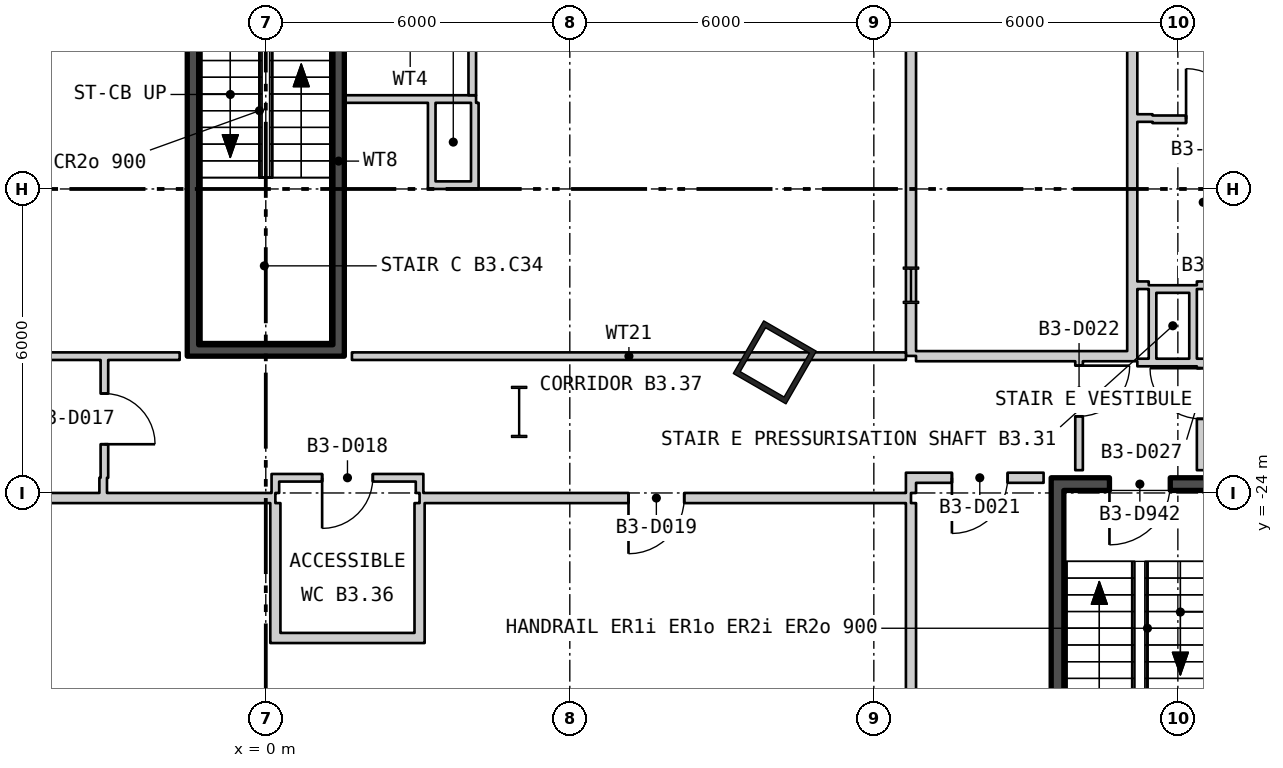
"""IFC4 building model, lengths in metres.
Left out: names, types, materials, properties, quantities, classifications, styles, units other than length and angle.
Written with IfcOpenShell. Run it as: python <this file> out.ifc"""

import sys

from ifc_helpers import new_model, si_unit, direction, frame, frame_2d, origin, origin_2d, place, context, subcontext, project, spatial, rectangle, hollow_rectangle, i_section, extrude, element, fill, save


model = new_model("IFC4")
c1 = context("Model", 3, precision=1e-05, world=origin(), true_north=direction((0.0, 1.0)))
c2 = subcontext(c1, "Body", "Model", "MODEL_VIEW")
j1 = project(units=[si_unit("LENGTHUNIT", "METRE"), si_unit("PLANEANGLEUNIT", "RADIAN")], contexts=[c1])
p1 = place(None, origin())
s1 = spatial("IfcSite", under=j1, at=p1, CompositionType="ELEMENT")
p2 = place(p1, origin())
s2 = spatial("IfcBuilding", under=s1, at=p2, CompositionType="ELEMENT")
p3 = place(p2, frame((0.0, 0.0, -16.8)))
s3 = spatial("IfcBuildingStorey", under=s2, at=p3, CompositionType="ELEMENT", Elevation=-16.8)
p4 = place(p3, frame((10.046, -21.422, 0.0), z_axis=(0.0, 0.0, 1.0), x_axis=(0.5, 0.866025403784, 0.0)))
e1 = element("IfcColumn", 1, at=p4, inside=s3, PredefinedType="COLUMN", context=c2, shape_type="SweptSolid", body=[
    extrude(hollow_rectangle(XDim=1.2, YDim=1.2, WallThickness=0.1, at=origin_2d()), origin(), (0.0, 0.0, 1.0), 5.4),
])
p5 = place(p3, frame((5.0, -22.4, 0.0), z_axis=(0.0, 0.0, 1.0), x_axis=(1.0, 0.0, 0.0)))
e2 = element("IfcColumn", 2, at=p5, inside=s3, PredefinedType="COLUMN", context=c2, shape_type="SweptSolid", body=[
    extrude(i_section(OverallWidth=0.302, OverallDepth=1.008, WebThickness=0.021, FlangeThickness=0.04, at=origin_2d()), origin(), (0.0, 0.0, 1.0), 5.4),
])
p6 = place(p3, frame((12.733, -19.9, 0.0), z_axis=(0.0, 0.0, 1.0), x_axis=(1.0, 0.0, 0.0)))
e3 = element("IfcColumn", 3, at=p6, inside=s3, PredefinedType="COLUMN", context=c2, shape_type="SweptSolid", body=[
    extrude(i_section(OverallWidth=0.304, OverallDepth=0.716, WebThickness=0.021, FlangeThickness=0.04, at=origin_2d()), origin(), (0.0, 0.0, 1.0), 5.4),
])
p7 = place(p3, frame((-1.438, -21.075, 0.0), z_axis=(0.0, 0.0, 1.0), x_axis=(0.0, 1.0, 0.0)))
e4 = element("IfcWall", 4, at=p7, inside=s3, PredefinedType="SHEAR", context=c2, shape_type="SweptSolid", body=[
    extrude(rectangle(XDim=7.25, YDim=0.225, at=frame_2d((3.625, 0.0))), origin(), (0.0, 0.0, 1.0), 4.95),
])
p8 = place(p3, frame((1.438, -21.075, 0.0), z_axis=(0.0, 0.0, 1.0), x_axis=(0.0, 1.0, 0.0)))
e5 = element("IfcWall", 5, at=p8, inside=s3, PredefinedType="SHEAR", context=c2, shape_type="SweptSolid", body=[
    extrude(rectangle(XDim=7.25, YDim=0.225, at=frame_2d((3.625, 0.0))), origin(), (0.0, 0.0, 1.0), 4.95),
])
p9 = place(p8, frame((5.94, 0.0, 0.0)))
e6 = element("IfcOpeningElement", 6, at=p9, cuts=e5, PredefinedType="OPENING", context=c2, shape_type="SweptSolid", body=[
    extrude(rectangle(XDim=1.0, YDim=2.1, at=frame_2d((0.5, 1.05))), frame((0.0, 0.122, 0.0), z_axis=(0.0, -1.0, 0.0), x_axis=(1.0, 0.0, 0.0)), (0.0, 0.0, 1.0), 0.245),
])
p10 = place(p3, frame((-1.55, -21.188, 0.0), z_axis=(0.0, 0.0, 1.0), x_axis=(1.0, 0.0, 0.0)))
e7 = element("IfcWall", 7, at=p10, inside=s3, PredefinedType="SHEAR", context=c2, shape_type="SweptSolid", body=[
    extrude(rectangle(XDim=3.1, YDim=0.225, at=frame_2d((1.55, 0.0))), origin(), (0.0, 0.0, 1.0), 4.95),
])
p11 = place(p3, frame((1.55, -16.225, 0.0), z_axis=(0.0, 0.0, 1.0), x_axis=(1.0, 0.0, 0.0)))
e8 = element("IfcWall", 8, at=p11, inside=s3, PredefinedType="PARTITIONING", context=c2, shape_type="SweptSolid", body=[
    extrude(rectangle(XDim=2.6, YDim=0.15, at=frame_2d((1.3, 0.0))), origin(), (0.0, 0.0, 1.0), 4.95),
])
p12 = place(p3, frame((4.075, -16.15, 0.0), z_axis=(0.0, 0.0, 1.0), x_axis=(0.0, 1.0, 0.0)))
e9 = element("IfcWall", 9, at=p12, inside=s3, PredefinedType="PARTITIONING", context=c2, shape_type="SweptSolid", body=[
    extrude(rectangle(XDim=2.4, YDim=0.15, at=frame_2d((1.2, 0.0))), origin(), (0.0, 0.0, 1.0), 4.95),
])
p13 = place(p3, frame((3.275, -18.0, 0.0), z_axis=(0.0, 0.0, 1.0), x_axis=(0.0, 1.0, 0.0)))
e10 = element("IfcWall", 10, at=p13, inside=s3, PredefinedType="PARTITIONING", context=c2, shape_type="SweptSolid", body=[
    extrude(rectangle(XDim=1.7, YDim=0.15, at=frame_2d((0.85, 0.0))), origin(), (0.0, 0.0, 1.0), 4.95),
])
p14 = place(p3, frame((3.35, -17.925, 0.0), z_axis=(0.0, 0.0, 1.0), x_axis=(1.0, 0.0, 0.0)))
e11 = element("IfcWall", 11, at=p14, inside=s3, PredefinedType="PARTITIONING", context=c2, shape_type="SweptSolid", body=[
    extrude(rectangle(XDim=0.7, YDim=0.15, at=frame_2d((0.35, 0.0))), origin(), (0.0, 0.0, 1.0), 4.95),
])
p15 = place(p3, frame((4.125, -18.0, 0.0), z_axis=(0.0, 0.0, 1.0), x_axis=(0.0, 1.0, 0.0)))
e12 = element("IfcWall", 12, at=p15, inside=s3, PredefinedType="PARTITIONING", context=c2, shape_type="SweptSolid", body=[
    extrude(rectangle(XDim=1.7, YDim=0.15, at=frame_2d((0.85, 0.0))), origin(), (0.0, 0.0, 1.0), 4.95),
])
p16 = place(p3, frame((15.625, -31.25, 0.0), z_axis=(0.0, 0.0, 1.0), x_axis=(0.0, 1.0, 0.0)))
e13 = element("IfcWall", 13, at=p16, inside=s3, PredefinedType="SHEAR", context=c2, shape_type="SweptSolid", body=[
    extrude(rectangle(XDim=7.3, YDim=0.25, at=frame_2d((3.65, 0.0))), origin(), (0.0, 0.0, 1.0), 4.95),
])
p17 = place(p3, frame((15.5, -23.825, 0.0), z_axis=(0.0, 0.0, 1.0), x_axis=(1.0, 0.0, 0.0)))
e14 = element("IfcWall", 14, at=p17, inside=s3, PredefinedType="SHEAR", context=c2, shape_type="SweptSolid", body=[
    extrude(rectangle(XDim=3.5, YDim=0.25, at=frame_2d((1.75, 0.0))), origin(), (0.0, 0.0, 1.0), 4.95),
])
p18 = place(p17, frame((1.15, 0.0, 0.0)))
e15 = element("IfcOpeningElement", 15, at=p18, cuts=e14, PredefinedType="OPENING", context=c2, shape_type="SweptSolid", body=[
    extrude(rectangle(XDim=1.2, YDim=2.1, at=frame_2d((0.6, 1.05))), frame((0.0, 0.135, 0.0), z_axis=(0.0, -1.0, 0.0), x_axis=(1.0, 0.0, 0.0)), (0.0, 0.0, 1.0), 0.27),
])
p19 = place(p3, frame((-17.175, -21.3, 0.0), z_axis=(0.0, 0.0, 1.0), x_axis=(1.0, 0.0, 0.0)))
e16 = element("IfcWall", 16, at=p19, inside=s3, PredefinedType="PARTITIONING", context=c2, shape_type="SweptSolid", body=[
    extrude(rectangle(XDim=15.475, YDim=0.15, at=frame_2d((7.737, 0.0))), origin(), (0.0, 0.0, 1.0), 4.95),
])
p20 = place(p19, frame((8.393, 0.0, 0.0)))
e17 = element("IfcOpeningElement", 17, at=p20, cuts=e16, PredefinedType="OPENING", context=c2, shape_type="SweptSolid", body=[
    extrude(rectangle(XDim=1.8, YDim=2.1, at=frame_2d((0.9, 1.05))), frame((0.0, 0.085, 0.0), z_axis=(0.0, -1.0, 0.0), x_axis=(1.0, 0.0, 0.0)), (0.0, 0.0, 1.0), 0.17),
])
p21 = place(p3, frame((-15.35, -24.1, 0.0), z_axis=(0.0, 0.0, 1.0), x_axis=(1.0, 0.0, 0.0)))
e18 = element("IfcWall", 18, at=p21, inside=s3, PredefinedType="PARTITIONING", context=c2, shape_type="SweptSolid", body=[
    extrude(rectangle(XDim=15.539, YDim=0.2, at=frame_2d((7.769, 0.0))), origin(), (0.0, 0.0, 1.0), 4.95),
])
p22 = place(p3, frame((-3.209, -24.0, 0.0), z_axis=(0.0, 0.0, 1.0), x_axis=(0.0, 1.0, 0.0)))
e19 = element("IfcWall", 19, at=p22, inside=s3, PredefinedType="PARTITIONING", context=c2, shape_type="SweptSolid", body=[
    extrude(rectangle(XDim=0.3, YDim=0.15, at=frame_2d((0.15, 0.0))), origin(), (0.0, 0.0, 1.0), 4.95),
])
p23 = place(p3, frame((-3.185, -23.7, 0.0), z_axis=(0.0, 0.0, 1.0), x_axis=(0.0, 1.0, 0.0)))
e20 = element("IfcWall", 20, at=p23, inside=s3, PredefinedType="PARTITIONING", context=c2, shape_type="SweptSolid", body=[
    extrude(rectangle(XDim=2.325, YDim=0.15, at=frame_2d((1.163, 0.0))), origin(), (0.0, 0.0, 1.0), 4.95),
])
p24 = place(p23, frame((0.662, 0.0, 0.0)))
e21 = element("IfcOpeningElement", 21, at=p24, cuts=e20, PredefinedType="OPENING", context=c2, shape_type="SweptSolid", body=[
    extrude(rectangle(XDim=1.0, YDim=2.1, at=frame_2d((0.5, 1.05))), frame((0.0, 0.085, 0.0), z_axis=(0.0, -1.0, 0.0), x_axis=(1.0, 0.0, 0.0)), (0.0, 0.0, 1.0), 0.17),
])
p25 = place(p3, frame((0.089, -26.862, 0.0), z_axis=(0.0, 0.0, 1.0), x_axis=(1.0, 0.0, 0.0)))
e22 = element("IfcWall", 22, at=p25, inside=s3, PredefinedType="PARTITIONING", context=c2, shape_type="SweptSolid", body=[
    extrude(rectangle(XDim=3.046, YDim=0.2, at=frame_2d((1.523, 0.0))), origin(), (0.0, 0.0, 1.0), 4.95),
])
p26 = place(p3, frame((0.114, -23.7, 0.0), z_axis=(0.0, 0.0, 1.0), x_axis=(1.0, 0.0, 0.0)))
e23 = element("IfcWall", 23, at=p26, inside=s3, PredefinedType="PARTITIONING", context=c2, shape_type="SweptSolid", body=[
    extrude(rectangle(XDim=2.996, YDim=0.15, at=frame_2d((1.498, 0.0))), origin(), (0.0, 0.0, 1.0), 4.95),
])
p27 = place(p26, frame((0.998, 0.0, 0.0)))
e24 = element("IfcOpeningElement", 24, at=p27, cuts=e23, PredefinedType="OPENING", context=c2, shape_type="SweptSolid", body=[
    extrude(rectangle(XDim=1.0, YDim=2.1, at=frame_2d((0.5, 1.05))), frame((0.0, 0.085, 0.0), z_axis=(0.0, -1.0, 0.0), x_axis=(1.0, 0.0, 0.0)), (0.0, 0.0, 1.0), 0.17),
])
p28 = place(p3, frame((0.189, -26.762, 0.0), z_axis=(0.0, 0.0, 1.0), x_axis=(0.0, 1.0, 0.0)))
e25 = element("IfcWall", 25, at=p28, inside=s3, PredefinedType="PARTITIONING", context=c2, shape_type="SweptSolid", body=[
    extrude(rectangle(XDim=2.562, YDim=0.2, at=frame_2d((1.281, 0.0))), origin(), (0.0, 0.0, 1.0), 4.95),
])
p29 = place(p3, frame((0.189, -24.0, 0.0), z_axis=(0.0, 0.0, 1.0), x_axis=(0.0, 1.0, 0.0)))
e26 = element("IfcWall", 26, at=p29, inside=s3, PredefinedType="PARTITIONING", context=c2, shape_type="SweptSolid", body=[
    extrude(rectangle(XDim=0.225, YDim=0.15, at=frame_2d((0.113, 0.0))), origin(), (0.0, 0.0, 1.0), 4.95),
])
p30 = place(p3, frame((1.7, -21.3, 0.0), z_axis=(0.0, 0.0, 1.0), x_axis=(1.0, 0.0, 0.0)))
e27 = element("IfcWall", 27, at=p30, inside=s3, PredefinedType="PARTITIONING", context=c2, shape_type="SweptSolid", body=[
    extrude(rectangle(XDim=10.933, YDim=0.15, at=frame_2d((5.466, 0.0))), origin(), (0.0, 0.0, 1.0), 4.95),
])
p31 = place(p3, frame((3.035, -26.762, 0.0), z_axis=(0.0, 0.0, 1.0), x_axis=(0.0, 1.0, 0.0)))
e28 = element("IfcWall", 28, at=p31, inside=s3, PredefinedType="PARTITIONING", context=c2, shape_type="SweptSolid", body=[
    extrude(rectangle(XDim=2.562, YDim=0.2, at=frame_2d((1.281, 0.0))), origin(), (0.0, 0.0, 1.0), 4.95),
])
p32 = place(p3, frame((3.035, -24.1, 0.0), z_axis=(0.0, 0.0, 1.0), x_axis=(1.0, 0.0, 0.0)))
e29 = element("IfcWall", 29, at=p32, inside=s3, PredefinedType="PARTITIONING", context=c2, shape_type="SweptSolid", body=[
    extrude(rectangle(XDim=9.698, YDim=0.2, at=frame_2d((4.849, 0.0))), origin(), (0.0, 0.0, 1.0), 4.95),
])
p33 = place(p32, frame((4.123, 0.0, 0.0)))
e30 = element("IfcOpeningElement", 30, at=p33, cuts=e29, PredefinedType="OPENING", context=c2, shape_type="SweptSolid", body=[
    extrude(rectangle(XDim=1.1, YDim=2.1, at=frame_2d((0.55, 1.05))), frame((0.0, 0.11, 0.0), z_axis=(0.0, -1.0, 0.0), x_axis=(1.0, 0.0, 0.0)), (0.0, 0.0, 1.0), 0.22),
])
p34 = place(p3, frame((3.035, -24.0, 0.0), z_axis=(0.0, 0.0, 1.0), x_axis=(0.0, 1.0, 0.0)))
e31 = element("IfcWall", 31, at=p34, inside=s3, PredefinedType="PARTITIONING", context=c2, shape_type="SweptSolid", body=[
    extrude(rectangle(XDim=0.225, YDim=0.15, at=frame_2d((0.113, 0.0))), origin(), (0.0, 0.0, 1.0), 4.95),
])
p35 = place(p3, frame((12.733, -32.9, 0.0), z_axis=(0.0, 0.0, 1.0), x_axis=(0.0, 1.0, 0.0)))
e32 = element("IfcWall", 32, at=p35, inside=s3, PredefinedType="PARTITIONING", context=c2, shape_type="SweptSolid", body=[
    extrude(rectangle(XDim=8.7, YDim=0.2, at=frame_2d((4.35, 0.0))), origin(), (0.0, 0.0, 1.0), 4.95),
])
p36 = place(p3, frame((12.733, -24.0, 0.0), z_axis=(0.0, 0.0, 1.0), x_axis=(0.0, 1.0, 0.0)))
e33 = element("IfcWall", 33, at=p36, inside=s3, PredefinedType="PARTITIONING", context=c2, shape_type="SweptSolid", body=[
    extrude(rectangle(XDim=0.4, YDim=0.2, at=frame_2d((0.2, 0.0))), origin(), (0.0, 0.0, 1.0), 4.95),
])
p37 = place(p3, frame((12.733, -21.295, 0.0), z_axis=(0.0, 0.0, 1.0), x_axis=(0.0, 1.0, 0.0)))
e34 = element("IfcWall", 34, at=p37, inside=s3, PredefinedType="PARTITIONING", context=c2, shape_type="SweptSolid", body=[
    extrude(rectangle(XDim=13.857, YDim=0.2, at=frame_2d((6.928, 0.0))), origin(), (0.0, 0.0, 1.0), 4.95),
])
p38 = place(p3, frame((12.833, -23.7, 0.0), z_axis=(0.0, 0.0, 1.0), x_axis=(1.0, 0.0, 0.0)))
e35 = element("IfcWall", 35, at=p38, inside=s3, PredefinedType="PARTITIONING", context=c2, shape_type="SweptSolid", body=[
    extrude(rectangle(XDim=2.517, YDim=0.2, at=frame_2d((1.258, 0.0))), origin(), (0.0, 0.0, 1.0), 4.95),
])
p39 = place(p38, frame((0.708, 0.0, 0.0)))
e36 = element("IfcOpeningElement", 36, at=p39, cuts=e35, PredefinedType="OPENING", context=c2, shape_type="SweptSolid", body=[
    extrude(rectangle(XDim=1.1, YDim=2.1, at=frame_2d((0.55, 1.05))), frame((0.0, 0.11, 0.0), z_axis=(0.0, -1.0, 0.0), x_axis=(1.0, 0.0, 0.0)), (0.0, 0.0, 1.0), 0.22),
])
p40 = place(p3, frame((12.833, -21.3, 0.0), z_axis=(0.0, 0.0, 1.0), x_axis=(1.0, 0.0, 0.0)))
e37 = element("IfcWall", 37, at=p40, inside=s3, PredefinedType="PARTITIONING", context=c2, shape_type="SweptSolid", body=[
    extrude(rectangle(XDim=4.167, YDim=0.2, at=frame_2d((2.083, 0.0))), origin(), (0.0, 0.0, 1.0), 4.95),
])
p41 = place(p3, frame((16.05, -23.55, 0.0), z_axis=(0.0, 0.0, 1.0), x_axis=(0.0, 1.0, 0.0)))
e38 = element("IfcWall", 38, at=p41, inside=s3, PredefinedType="PARTITIONING", context=c2, shape_type="SweptSolid", body=[
    extrude(rectangle(XDim=2.15, YDim=0.15, at=frame_2d((1.075, 0.0))), origin(), (0.0, 0.0, 1.0), 4.95),
])
p42 = place(p41, frame((1.063, 0.0, 0.0)))
e39 = element("IfcOpeningElement", 39, at=p42, cuts=e38, PredefinedType="OPENING", context=c2, shape_type="SweptSolid", body=[
    extrude(rectangle(XDim=1.0, YDim=2.1, at=frame_2d((0.5, 1.05))), frame((0.0, 0.085, 0.0), z_axis=(0.0, -1.0, 0.0), x_axis=(1.0, 0.0, 0.0)), (0.0, 0.0, 1.0), 0.17),
])
p43 = place(p3, frame((17.1, -21.4, 0.0), z_axis=(0.0, 0.0, 1.0), x_axis=(0.0, 1.0, 0.0)))
e40 = element("IfcWall", 40, at=p43, inside=s3, PredefinedType="PARTITIONING", context=c2, shape_type="SweptSolid", body=[
    extrude(rectangle(XDim=19.1, YDim=0.2, at=frame_2d((9.55, 0.0))), origin(), (0.0, 0.0, 1.0), 4.95),
])
p44 = place(p43, frame((7.4, 0.0, 0.0)))
e41 = element("IfcOpeningElement", 41, at=p44, cuts=e40, PredefinedType="OPENING", context=c2, shape_type="SweptSolid", body=[
    extrude(rectangle(XDim=1.1, YDim=2.1, at=frame_2d((0.55, 1.05))), frame((0.0, 0.11, 0.0), z_axis=(0.0, -1.0, 0.0), x_axis=(1.0, 0.0, 0.0)), (0.0, 0.0, 1.0), 0.22),
])
for number, where, z_axis, x_axis in (
    (42, (17.2, -21.425, 0.0), (0.0, 0.0, 1.0), (1.0, 0.0, 0.0)),
    (43, (17.2, -19.9, 0.0), (0.0, 0.0, 1.0), (1.0, 0.0, 0.0)),
):
    element("IfcWall", number, at=place(p3, frame(where, z_axis=z_axis, x_axis=x_axis)), inside=s3, PredefinedType="PARTITIONING", context=c2, shape_type="SweptSolid", body=[
        extrude(rectangle(XDim=0.225, YDim=0.15, at=frame_2d((0.113, 0.0))), origin(), (0.0, 0.0, 1.0), 4.95),
    ])
p45 = place(p3, frame((17.2, -16.6, 0.0), z_axis=(0.0, 0.0, 1.0), x_axis=(1.0, 0.0, 0.0)))
e44 = element("IfcWall", 44, at=p45, inside=s3, PredefinedType="PARTITIONING", context=c2, shape_type="SweptSolid", body=[
    extrude(rectangle(XDim=0.3, YDim=0.15, at=frame_2d((0.15, 0.0))), origin(), (0.0, 0.0, 1.0), 4.95),
])
p46 = place(p3, frame((17.5, -21.5, 0.0), z_axis=(0.0, 0.0, 1.0), x_axis=(0.0, 1.0, 0.0)))
e45 = element("IfcWall", 45, at=p46, inside=s3, PredefinedType="PARTITIONING", context=c2, shape_type="SweptSolid", body=[
    extrude(rectangle(XDim=1.6, YDim=0.15, at=frame_2d((0.8, 0.0))), origin(), (0.0, 0.0, 1.0), 4.95),
])
p47 = place(p3, frame((17.5, -16.625, 0.0), z_axis=(0.0, 0.0, 1.0), x_axis=(1.0, 0.0, 0.0)))
e46 = element("IfcWall", 46, at=p47, inside=s3, PredefinedType="PARTITIONING", context=c2, shape_type="SweptSolid", body=[
    extrude(rectangle(XDim=2.325, YDim=0.15, at=frame_2d((1.163, 0.0))), origin(), (0.0, 0.0, 1.0), 4.95),
])
p48 = place(p47, frame((0.662, 0.0, 0.0)))
e47 = element("IfcOpeningElement", 47, at=p48, cuts=e46, PredefinedType="OPENING", context=c2, shape_type="SweptSolid", body=[
    extrude(rectangle(XDim=1.0, YDim=2.1, at=frame_2d((0.5, 1.05))), frame((0.0, 0.085, 0.0), z_axis=(0.0, -1.0, 0.0), x_axis=(1.0, 0.0, 0.0)), (0.0, 0.0, 1.0), 0.17),
])
for number, where, z_axis, x_axis in (
    (48, (17.575, -21.425, 0.0), (0.0, 0.0, 1.0), (1.0, 0.0, 0.0)),
    (49, (17.575, -19.975, 0.0), (0.0, 0.0, 1.0), (1.0, 0.0, 0.0)),
):
    element("IfcWall", number, at=place(p3, frame(where, z_axis=z_axis, x_axis=x_axis)), inside=s3, PredefinedType="PARTITIONING", context=c2, shape_type="SweptSolid", body=[
        extrude(rectangle(XDim=0.65, YDim=0.15, at=frame_2d((0.325, 0.0))), origin(), (0.0, 0.0, 1.0), 4.95),
    ])
p49 = place(p3, frame((18.3, -21.5, 0.0), z_axis=(0.0, 0.0, 1.0), x_axis=(0.0, 1.0, 0.0)))
e50 = element("IfcWall", 50, at=p49, inside=s3, PredefinedType="PARTITIONING", context=c2, shape_type="SweptSolid", body=[
    extrude(rectangle(XDim=1.6, YDim=0.15, at=frame_2d((0.8, 0.0))), origin(), (0.0, 0.0, 1.0), 4.95),
])
p50 = place(p3, frame((18.375, -19.9, 0.0), z_axis=(0.0, 0.0, 1.0), x_axis=(1.0, 0.0, 0.0)))
e51 = element("IfcWall", 51, at=p50, inside=s3, PredefinedType="PARTITIONING", context=c2, shape_type="SweptSolid", body=[
    extrude(rectangle(XDim=1.45, YDim=0.15, at=frame_2d((0.725, 0.0))), origin(), (0.0, 0.0, 1.0), 4.95),
])
p51 = place(p50, frame((0.225, 0.0, 0.0)))
e52 = element("IfcOpeningElement", 52, at=p51, cuts=e51, PredefinedType="OPENING", context=c2, shape_type="SweptSolid", body=[
    extrude(rectangle(XDim=1.0, YDim=2.1, at=frame_2d((0.5, 1.05))), frame((0.0, 0.085, 0.0), z_axis=(0.0, -1.0, 0.0), x_axis=(1.0, 0.0, 0.0)), (0.0, 0.0, 1.0), 0.17),
])
p52 = place(p3, frame((18.45, -23.55, 0.0), z_axis=(0.0, 0.0, 1.0), x_axis=(0.0, 1.0, 0.0)))
e53 = element("IfcWall", 53, at=p52, inside=s3, PredefinedType="PARTITIONING", context=c2, shape_type="SweptSolid", body=[
    extrude(rectangle(XDim=2.2, YDim=0.15, at=frame_2d((1.1, 0.0))), origin(), (0.0, 0.0, 1.0), 4.95),
])
p53 = place(p52, frame((1.013, 0.0, 0.0)))
e54 = element("IfcOpeningElement", 54, at=p53, cuts=e53, PredefinedType="OPENING", context=c2, shape_type="SweptSolid", body=[
    extrude(rectangle(XDim=1.0, YDim=2.1, at=frame_2d((0.5, 1.05))), frame((0.0, 0.085, 0.0), z_axis=(0.0, -1.0, 0.0), x_axis=(1.0, 0.0, 0.0)), (0.0, 0.0, 1.0), 0.17),
])
p54 = place(p18, origin())
e55 = element("IfcDoor", 55, at=p54, inside=s3, OperationType="SINGLE_SWING_LEFT", PredefinedType="DOOR", context=c2, shape_type="SweptSolid", body=[
    extrude(rectangle(XDim=1.2, YDim=2.1, at=frame_2d((0.6, 1.05))), frame((0.0, 0.025, 0.0), z_axis=(0.0, -1.0, 0.0), x_axis=(1.0, 0.0, 0.0)), (0.0, 0.0, 1.0), 0.05),
])
fill(e15, e55)
p55 = place(p24, origin())
e56 = element("IfcDoor", 56, at=p55, inside=s3, OperationType="SINGLE_SWING_LEFT", PredefinedType="DOOR", context=c2, shape_type="SweptSolid", body=[
    extrude(rectangle(XDim=1.0, YDim=2.1, at=frame_2d((0.5, 1.05))), frame((0.0, 0.025, 0.0), z_axis=(0.0, -1.0, 0.0), x_axis=(1.0, 0.0, 0.0)), (0.0, 0.0, 1.0), 0.05),
])
fill(e21, e56)
p56 = place(p27, origin())
e57 = element("IfcDoor", 57, at=p56, inside=s3, OperationType="SINGLE_SWING_LEFT", PredefinedType="DOOR", context=c2, shape_type="SweptSolid", body=[
    extrude(rectangle(XDim=1.0, YDim=2.1, at=frame_2d((0.5, 1.05))), frame((0.0, 0.025, 0.0), z_axis=(0.0, -1.0, 0.0), x_axis=(1.0, 0.0, 0.0)), (0.0, 0.0, 1.0), 0.05),
])
fill(e24, e57)
p57 = place(p33, origin())
e58 = element("IfcDoor", 58, at=p57, inside=s3, OperationType="SINGLE_SWING_LEFT", PredefinedType="DOOR", context=c2, shape_type="SweptSolid", body=[
    extrude(rectangle(XDim=1.1, YDim=2.1, at=frame_2d((0.55, 1.05))), frame((0.0, 0.025, 0.0), z_axis=(0.0, -1.0, 0.0), x_axis=(1.0, 0.0, 0.0)), (0.0, 0.0, 1.0), 0.05),
])
fill(e30, e58)
p58 = place(p39, origin())
e59 = element("IfcDoor", 59, at=p58, inside=s3, OperationType="SINGLE_SWING_LEFT", PredefinedType="DOOR", context=c2, shape_type="SweptSolid", body=[
    extrude(rectangle(XDim=1.1, YDim=2.1, at=frame_2d((0.55, 1.05))), frame((0.0, 0.025, 0.0), z_axis=(0.0, -1.0, 0.0), x_axis=(1.0, 0.0, 0.0)), (0.0, 0.0, 1.0), 0.05),
])
fill(e36, e59)
p59 = place(p42, origin())
e60 = element("IfcDoor", 60, at=p59, inside=s3, OperationType="SINGLE_SWING_RIGHT", PredefinedType="DOOR", context=c2, shape_type="SweptSolid", body=[
    extrude(rectangle(XDim=1.0, YDim=2.1, at=frame_2d((0.5, 1.05))), frame((0.0, 0.025, 0.0), z_axis=(0.0, -1.0, 0.0), x_axis=(1.0, 0.0, 0.0)), (0.0, 0.0, 1.0), 0.05),
])
fill(e39, e60)
p60 = place(p48, origin())
e61 = element("IfcDoor", 61, at=p60, inside=s3, OperationType="SINGLE_SWING_RIGHT", PredefinedType="DOOR", context=c2, shape_type="SweptSolid", body=[
    extrude(rectangle(XDim=1.0, YDim=2.1, at=frame_2d((0.5, 1.05))), frame((0.0, 0.025, 0.0), z_axis=(0.0, -1.0, 0.0), x_axis=(1.0, 0.0, 0.0)), (0.0, 0.0, 1.0), 0.05),
])
fill(e47, e61)
p61 = place(p53, origin())
e62 = element("IfcDoor", 62, at=p61, inside=s3, OperationType="SINGLE_SWING_LEFT", PredefinedType="DOOR", context=c2, shape_type="SweptSolid", body=[
    extrude(rectangle(XDim=1.0, YDim=2.1, at=frame_2d((0.5, 1.05))), frame((0.0, 0.025, 0.0), z_axis=(0.0, -1.0, 0.0), x_axis=(1.0, 0.0, 0.0)), (0.0, 0.0, 1.0), 0.05),
])
fill(e54, e62)
save(model, sys.argv[1])
